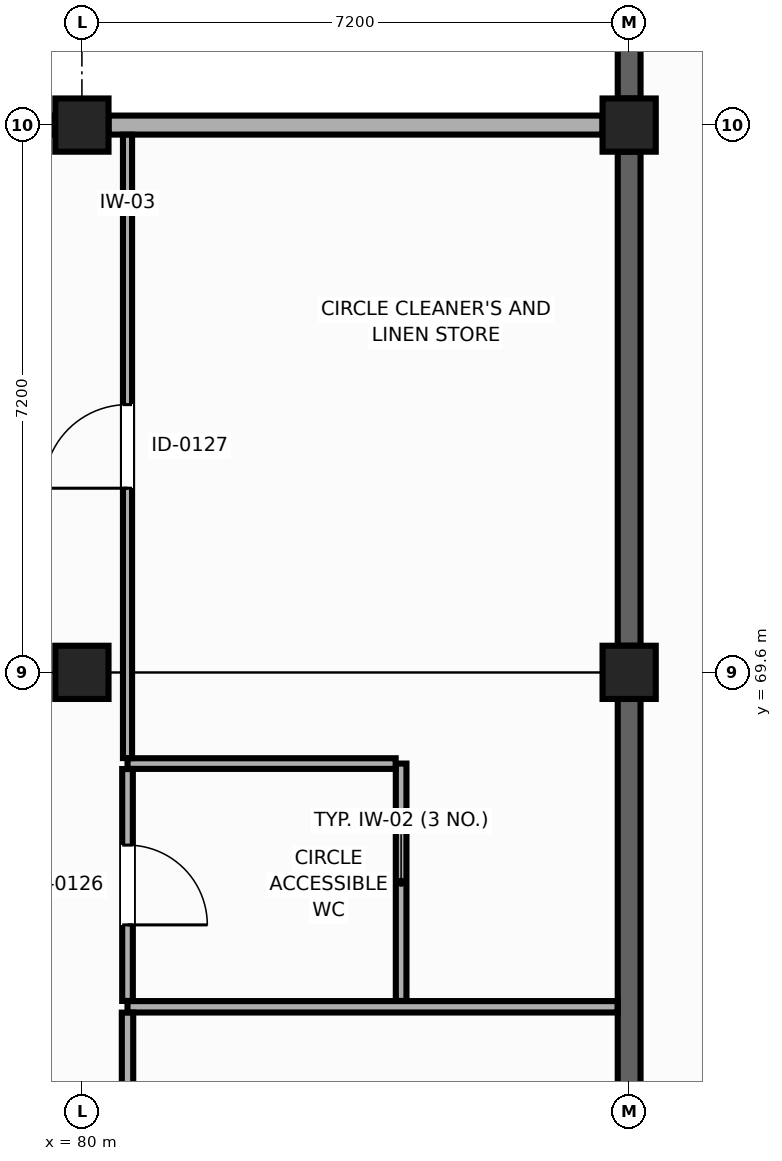
"""IFC4 building model, lengths in metres.
Left out: names, types, materials, properties, quantities, classifications, styles, units other than length and angle.
Written with IfcOpenShell. Run it as: python <this file> out.ifc"""

import sys

from ifc_helpers import new_model, si_unit, direction, frame, frame_2d, origin, origin_2d, place, context, subcontext, project, spatial, rectangle, extrude, element, fill, save


model = new_model("IFC4")
c1 = context("Model", 3, precision=1e-05, world=origin(), true_north=direction((0.0, 1.0)))
c2 = subcontext(c1, "Body", "Model", "MODEL_VIEW")
j1 = project(units=[si_unit("LENGTHUNIT", "METRE"), si_unit("PLANEANGLEUNIT", "RADIAN")], contexts=[c1])
p1 = place(None, origin())
s1 = spatial("IfcSite", under=j1, at=p1, CompositionType="ELEMENT")
p2 = place(p1, origin())
s2 = spatial("IfcBuilding", under=s1, at=p2, CompositionType="ELEMENT")
p3 = place(p2, frame((0.0, 0.0, 5.4)))
s3 = spatial("IfcBuildingStorey", under=s2, at=p3, CompositionType="ELEMENT", Elevation=5.4)
for number, where, z_axis, x_axis in (
    (1, (80.0, 69.6, 0.0), (0.0, 0.0, 1.0), (0.0, 1.0, 0.0)),
    (2, (87.2, 69.6, 0.0), (0.0, 0.0, 1.0), (1.0, 0.0, 0.0)),
):
    element("IfcColumn", number, at=place(p3, frame(where, z_axis=z_axis, x_axis=x_axis)), inside=s3, PredefinedType="COLUMN", context=c2, shape_type="SweptSolid", body=[
        extrude(rectangle(XDim=0.7, YDim=0.7, at=origin_2d()), origin(), (0.0, 0.0, 1.0), 4.5),
    ])
p4 = place(p3, frame((80.0, 76.8, 0.0), z_axis=(0.0, 0.0, 1.0), x_axis=(1.0, 0.0, 0.0)))
e3 = element("IfcColumn", 3, at=p4, inside=s3, PredefinedType="COLUMN", context=c2, shape_type="SweptSolid", body=[
    extrude(rectangle(XDim=0.7, YDim=0.7, at=origin_2d()), origin(), (0.0, 0.0, 1.0), 4.25),
])
p5 = place(p3, frame((87.2, 76.8, 0.0), z_axis=(0.0, 0.0, 1.0), x_axis=(1.0, 0.0, 0.0)))
e4 = element("IfcColumn", 4, at=p5, inside=s3, PredefinedType="COLUMN", context=c2, shape_type="SweptSolid", body=[
    extrude(rectangle(XDim=0.7, YDim=0.7, at=origin_2d()), origin(), (0.0, 0.0, 1.0), 4.5),
])
p6 = place(p3, frame((73.15, 76.8, 0.0), z_axis=(0.0, 0.0, 1.0), x_axis=(1.0, 0.0, 0.0)))
e5 = element("IfcWall", 5, at=p6, inside=s3, PredefinedType="SOLIDWALL", context=c2, shape_type="SweptSolid", body=[
    extrude(rectangle(XDim=6.5, YDim=0.25, at=frame_2d((3.25, 0.0))), origin(), (0.0, 0.0, 1.0), 3.445),
])
p7 = place(p6, frame((2.05, 0.0, 1.8)))
e6 = element("IfcOpeningElement", 6, at=p7, cuts=e5, PredefinedType="OPENING", context=c2, shape_type="SweptSolid", body=[
    extrude(rectangle(XDim=2.4, YDim=1.2, at=frame_2d((1.2, 0.6))), frame((0.0, 0.135, 0.0), z_axis=(0.0, -1.0, 0.0), x_axis=(1.0, 0.0, 0.0)), (0.0, 0.0, 1.0), 0.27),
])
p8 = place(p3, frame((80.35, 76.8, 0.0), z_axis=(0.0, 0.0, 1.0), x_axis=(1.0, 0.0, 0.0)))
e7 = element("IfcWall", 7, at=p8, inside=s3, PredefinedType="SOLIDWALL", context=c2, shape_type="SweptSolid", body=[
    extrude(rectangle(XDim=6.5, YDim=0.25, at=frame_2d((3.25, 0.0))), origin(), (0.0, 0.0, 1.0), 3.445),
])
for number, where, z_axis, x_axis in (
    (8, (87.2, 62.75, 0.0), (0.0, 0.0, 1.0), (0.0, 1.0, 0.0)),
    (9, (87.2, 69.95, 0.0), (0.0, 0.0, 1.0), (0.0, 1.0, 0.0)),
):
    element("IfcWall", number, at=place(p3, frame(where, z_axis=z_axis, x_axis=x_axis)), inside=s3, PredefinedType="SHEAR", context=c2, shape_type="SweptSolid", body=[
        extrude(rectangle(XDim=6.5, YDim=0.3, at=frame_2d((3.25, 0.0))), origin(), (0.0, 0.0, 1.0), 4.22),
    ])
p9 = place(p3, frame((87.2, 77.15, 0.0), z_axis=(0.0, 0.0, 1.0), x_axis=(0.0, 1.0, 0.0)))
e10 = element("IfcWall", 10, at=p9, inside=s3, PredefinedType="SHEAR", context=c2, shape_type="SweptSolid", body=[
    extrude(rectangle(XDim=6.664, YDim=0.3, at=frame_2d((3.332, 0.0))), origin(), (0.0, 0.0, 1.0), 4.22),
])
p10 = place(p3, frame((87.048, 65.2, 0.0), z_axis=(0.0, 0.0, 1.0), x_axis=(-1.0, 0.0, 0.0)))
e11 = element("IfcWall", 11, at=p10, inside=s3, PredefinedType="PARTITIONING", context=c2, shape_type="SweptSolid", body=[
    extrude(rectangle(XDim=6.448, YDim=0.15, at=frame_2d((3.224, 0.0))), origin(), (0.0, 0.0, 1.0), 4.25),
])
p11 = place(p3, frame((80.6, 65.123, 0.0), z_axis=(0.0, 0.0, 1.0), x_axis=(0.0, -1.0, 0.0)))
e12 = element("IfcWall", 12, at=p11, inside=s3, PredefinedType="PARTITIONING", context=c2, shape_type="SweptSolid", body=[
    extrude(rectangle(XDim=6.323, YDim=0.15, at=frame_2d((3.162, 0.0))), origin(), (0.0, 0.0, 1.0), 3.445),
])
p12 = place(p3, frame((84.2, 65.277, 0.0), z_axis=(0.0, 0.0, 1.0), x_axis=(0.0, 1.0, 0.0)))
e13 = element("IfcWall", 13, at=p12, inside=s3, PredefinedType="PARTITIONING", context=c2, shape_type="SweptSolid", body=[
    extrude(rectangle(XDim=3.123, YDim=0.14, at=frame_2d((1.562, 0.0))), origin(), (0.0, 0.0, 1.0), 3.845),
])
p13 = place(p3, frame((84.128, 68.4, 0.0), z_axis=(0.0, 0.0, 1.0), x_axis=(-1.0, 0.0, 0.0)))
e14 = element("IfcWall", 14, at=p13, inside=s3, PredefinedType="PARTITIONING", context=c2, shape_type="SweptSolid", body=[
    extrude(rectangle(XDim=3.528, YDim=0.14, at=frame_2d((1.764, 0.0))), origin(), (0.0, 0.0, 1.0), 4.25),
])
p14 = place(p3, frame((80.6, 68.328, 0.0), z_axis=(0.0, 0.0, 1.0), x_axis=(0.0, -1.0, 0.0)))
e15 = element("IfcWall", 15, at=p14, inside=s3, PredefinedType="PARTITIONING", context=c2, shape_type="SweptSolid", body=[
    extrude(rectangle(XDim=3.051, YDim=0.14, at=frame_2d((1.525, 0.0))), origin(), (0.0, 0.0, 1.0), 3.845),
])
p15 = place(p14, frame((1.0, 0.0, 0.0)))
e16 = element("IfcOpeningElement", 16, at=p15, cuts=e15, PredefinedType="OPENING", context=c2, shape_type="SweptSolid", body=[
    extrude(rectangle(XDim=1.05, YDim=2.12, at=frame_2d((0.525, 1.06))), frame((0.0, 0.08, 0.0), z_axis=(0.0, -1.0, 0.0), x_axis=(1.0, 0.0, 0.0)), (0.0, 0.0, 1.0), 0.16),
])
p16 = place(p3, frame((80.6, 68.472, 0.0), z_axis=(0.0, 0.0, 1.0), x_axis=(0.0, 1.0, 0.0)))
e17 = element("IfcWall", 17, at=p16, inside=s3, PredefinedType="PARTITIONING", context=c2, shape_type="SweptSolid", body=[
    extrude(rectangle(XDim=8.201, YDim=0.12, at=frame_2d((4.101, 0.0))), origin(), (0.0, 0.0, 1.0), 3.445),
])
p17 = place(p16, frame((3.551, 0.0, 0.0)))
e18 = element("IfcOpeningElement", 18, at=p17, cuts=e17, PredefinedType="OPENING", context=c2, shape_type="SweptSolid", body=[
    extrude(rectangle(XDim=1.1, YDim=2.15, at=frame_2d((0.55, 1.075))), frame((0.0, 0.07, 0.0), z_axis=(0.0, -1.0, 0.0), x_axis=(1.0, 0.0, 0.0)), (0.0, 0.0, 1.0), 0.14),
])
p18 = place(p15, origin())
e19 = element("IfcDoor", 19, at=p18, inside=s3, OperationType="SINGLE_SWING_RIGHT", PredefinedType="DOOR", context=c2, shape_type="SweptSolid", body=[
    extrude(rectangle(XDim=1.05, YDim=2.12, at=frame_2d((0.525, 1.06))), frame((0.0, 0.025, 0.0), z_axis=(0.0, -1.0, 0.0), x_axis=(1.0, 0.0, 0.0)), (0.0, 0.0, 1.0), 0.05),
])
fill(e16, e19)
p19 = place(p17, origin())
e20 = element("IfcDoor", 20, at=p19, inside=s3, OperationType="SINGLE_SWING_LEFT", PredefinedType="DOOR", context=c2, shape_type="SweptSolid", body=[
    extrude(rectangle(XDim=1.1, YDim=2.15, at=frame_2d((0.55, 1.075))), frame((0.0, 0.025, 0.0), z_axis=(0.0, -1.0, 0.0), x_axis=(1.0, 0.0, 0.0)), (0.0, 0.0, 1.0), 0.05),
])
fill(e18, e20)
save(model, sys.argv[1])
